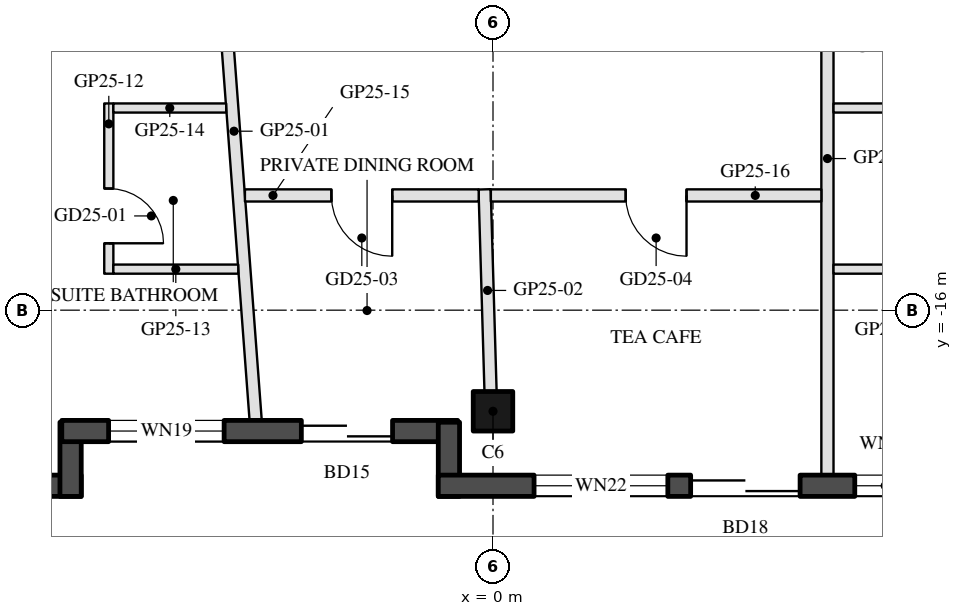
"""IFC4 building model, lengths in metres.
Left out: names, types, materials, properties, quantities, classifications, styles, units other than length and angle.
Written with IfcOpenShell. Run it as: python <this file> out.ifc"""

import sys

from ifc_helpers import new_model, si_unit, direction, frame, frame_2d, origin, origin_2d, place, context, subcontext, project, spatial, rectangle, hollow_rectangle, extrude, boolean, halfspace, element, fill, save


model = new_model("IFC4")
c1 = context("Model", 3, precision=1e-05, world=origin(), true_north=direction((0.0, 1.0)))
c2 = subcontext(c1, "Body", "Model", "MODEL_VIEW")
j1 = project(units=[si_unit("LENGTHUNIT", "METRE"), si_unit("PLANEANGLEUNIT", "RADIAN")], contexts=[c1])
p1 = place(None, origin())
s1 = spatial("IfcSite", under=j1, at=p1, CompositionType="ELEMENT")
p2 = place(p1, origin())
s2 = spatial("IfcBuilding", under=s1, at=p2, CompositionType="ELEMENT")
p3 = place(p2, frame((0.0, 0.0, 261.5)))
s3 = spatial("IfcBuildingStorey", under=s2, at=p3, CompositionType="ELEMENT", Elevation=261.5)
p4 = place(p3, frame((0.0, -17.663, 0.0), z_axis=(0.0, 0.0, 1.0), x_axis=(-1.0, 0.0, 0.0)))
e1 = element("IfcColumn", 1, at=p4, inside=s3, PredefinedType="COLUMN", context=c2, shape_type="SweptSolid", body=[
    boolean("DIFFERENCE", extrude(hollow_rectangle(XDim=0.65, YDim=0.65, WallThickness=0.03, at=origin_2d()), origin(), (0.0, 0.0, 1.0), 3.7), halfspace(frame((0.0, 0.0, 3.663), z_axis=(0.0, 0.0, 1.0), x_axis=(1.0, 0.0, 0.0)), False)),
])
p5 = place(p3, frame((-18.272, -18.888, 0.0), z_axis=(0.0, 0.0, 1.0), x_axis=(1.0, 0.0, 0.0)))
e2 = element("IfcWall", 2, at=p5, inside=s3, PredefinedType="SOLIDWALL", context=c2, shape_type="SweptSolid", body=[
    extrude(rectangle(XDim=11.5, YDim=0.35, at=frame_2d((5.75, 0.0))), origin(), (0.0, 0.0, 1.0), 3.55),
])
p6 = place(p5, frame((0.38, 0.0, 0.3)))
e3 = element("IfcOpeningElement", 3, at=p6, cuts=e2, PredefinedType="OPENING", context=c2, shape_type="SweptSolid", body=[
    extrude(rectangle(XDim=1.8, YDim=2.65, at=frame_2d((0.9, 1.325))), frame((0.0, 0.185, 0.0), z_axis=(0.0, -1.0, 0.0), x_axis=(1.0, 0.0, 0.0)), (0.0, 0.0, 1.0), 0.37),
])
p7 = place(p5, frame((7.525, 0.0, 0.0)))
e4 = element("IfcOpeningElement", 4, at=p7, cuts=e2, PredefinedType="OPENING", context=c2, shape_type="SweptSolid", body=[
    extrude(rectangle(XDim=2.4, YDim=2.4, at=frame_2d((1.2, 1.2))), frame((0.0, 0.185, 0.0), z_axis=(0.0, -1.0, 0.0), x_axis=(1.0, 0.0, 0.0)), (0.0, 0.0, 1.0), 0.37),
])
p8 = place(p5, frame((3.604, 0.0, 0.3)))
e5 = element("IfcOpeningElement", 5, at=p8, cuts=e2, PredefinedType="OPENING", context=c2, shape_type="SweptSolid", body=[
    extrude(rectangle(XDim=1.6, YDim=2.65, at=frame_2d((0.8, 1.325))), frame((0.0, 0.185, 0.0), z_axis=(0.0, -1.0, 0.0), x_axis=(1.0, 0.0, 0.0)), (0.0, 0.0, 1.0), 0.37),
])
p9 = place(p5, frame((5.504, 0.0, 0.3)))
e6 = element("IfcOpeningElement", 6, at=p9, cuts=e2, PredefinedType="OPENING", context=c2, shape_type="SweptSolid", body=[
    extrude(rectangle(XDim=1.6, YDim=2.65, at=frame_2d((0.8, 1.325))), frame((0.0, 0.185, 0.0), z_axis=(0.0, -1.0, 0.0), x_axis=(1.0, 0.0, 0.0)), (0.0, 0.0, 1.0), 0.37),
])
p10 = place(p3, frame((-6.947, -19.063, 0.0), z_axis=(0.0, 0.0, 1.0), x_axis=(0.0, 1.0, 0.0)))
e7 = element("IfcWall", 7, at=p10, inside=s3, PredefinedType="SOLIDWALL", context=c2, shape_type="SweptSolid", body=[
    extrude(rectangle(XDim=1.22, YDim=0.35, at=frame_2d((0.61, 0.0))), origin(), (0.0, 0.0, 1.0), 3.55),
])
p11 = place(p3, frame((-7.092, -17.988, 0.0), z_axis=(0.0, 0.0, 1.0), x_axis=(1.0, 0.0, 0.0)))
e8 = element("IfcWall", 8, at=p11, inside=s3, PredefinedType="SOLIDWALL", context=c2, shape_type="SweptSolid", body=[
    extrude(rectangle(XDim=6.512, YDim=0.35, at=frame_2d((3.256, 0.0))), origin(), (0.0, 0.0, 1.0), 3.55),
])
p12 = place(p11, frame((0.77, 0.0, 0.3)))
e9 = element("IfcOpeningElement", 9, at=p12, cuts=e8, PredefinedType="OPENING", context=c2, shape_type="SweptSolid", body=[
    extrude(rectangle(XDim=1.9, YDim=2.65, at=frame_2d((0.95, 1.325))), frame((0.0, 0.185, 0.0), z_axis=(0.0, -1.0, 0.0), x_axis=(1.0, 0.0, 0.0)), (0.0, 0.0, 1.0), 0.37),
])
p13 = place(p11, frame((3.94, 0.0, 0.0)))
e10 = element("IfcOpeningElement", 10, at=p13, cuts=e8, PredefinedType="OPENING", context=c2, shape_type="SweptSolid", body=[
    extrude(rectangle(XDim=1.5, YDim=2.4, at=frame_2d((0.75, 1.2))), frame((0.0, 0.185, 0.0), z_axis=(0.0, -1.0, 0.0), x_axis=(1.0, 0.0, 0.0)), (0.0, 0.0, 1.0), 0.37),
])
p14 = place(p3, frame((-0.725, -17.843, 0.0), z_axis=(0.0, 0.0, 1.0), x_axis=(0.0, -1.0, 0.0)))
e11 = element("IfcWall", 11, at=p14, inside=s3, PredefinedType="SOLIDWALL", context=c2, shape_type="SweptSolid", body=[
    extrude(rectangle(XDim=1.22, YDim=0.35, at=frame_2d((0.61, 0.0))), origin(), (0.0, 0.0, 1.0), 3.55),
])
p15 = place(p3, frame((-0.9, -18.888, 0.0), z_axis=(0.0, 0.0, 1.0), x_axis=(1.0, 0.0, 0.0)))
e12 = element("IfcWall", 12, at=p15, inside=s3, PredefinedType="SOLIDWALL", context=c2, shape_type="SweptSolid", body=[
    extrude(rectangle(XDim=9.472, YDim=0.35, at=frame_2d((4.736, 0.0))), origin(), (0.0, 0.0, 1.0), 3.55),
])
p16 = place(p15, frame((4.15, 0.0, 0.0)))
e13 = element("IfcOpeningElement", 13, at=p16, cuts=e12, PredefinedType="OPENING", context=c2, shape_type="SweptSolid", body=[
    extrude(rectangle(XDim=1.8, YDim=2.4, at=frame_2d((0.9, 1.2))), frame((0.0, 0.185, 0.0), z_axis=(0.0, -1.0, 0.0), x_axis=(1.0, 0.0, 0.0)), (0.0, 0.0, 1.0), 0.37),
])
p17 = place(p15, frame((1.575, 0.0, 0.3)))
e14 = element("IfcOpeningElement", 14, at=p17, cuts=e12, PredefinedType="OPENING", context=c2, shape_type="SweptSolid", body=[
    extrude(rectangle(XDim=2.2, YDim=2.65, at=frame_2d((1.1, 1.325))), frame((0.0, 0.185, 0.0), z_axis=(0.0, -1.0, 0.0), x_axis=(1.0, 0.0, 0.0)), (0.0, 0.0, 1.0), 0.37),
])
p18 = place(p15, frame((6.85, 0.0, 0.3)))
e15 = element("IfcOpeningElement", 15, at=p18, cuts=e12, PredefinedType="OPENING", context=c2, shape_type="SweptSolid", body=[
    extrude(rectangle(XDim=1.0, YDim=2.65, at=frame_2d((0.5, 1.325))), frame((0.0, 0.185, 0.0), z_axis=(0.0, -1.0, 0.0), x_axis=(1.0, 0.0, 0.0)), (0.0, 0.0, 1.0), 0.37),
])
p19 = place(p3, frame((-3.903, -17.813, 0.0), z_axis=(0.0, 0.0, 1.0), x_axis=(-0.074602257677, 0.997213368918, 0.0)))
e16 = element("IfcWall", 16, at=p19, inside=s3, PredefinedType="PARTITIONING", context=c2, shape_type="SweptSolid", body=[
    extrude(rectangle(XDim=9.54, YDim=0.2, at=frame_2d((4.77, 0.0))), origin(), (0.0, 0.0, 1.0), 3.0),
])
p20 = place(p3, frame((-0.04, -17.338, 0.0), z_axis=(0.0, 0.0, 1.0), x_axis=(-0.029431403757, 0.999566802406, 0.0)))
e17 = element("IfcWall", 17, at=p20, inside=s3, PredefinedType="PARTITIONING", context=c2, shape_type="SweptSolid", body=[
    extrude(rectangle(XDim=3.326, YDim=0.2, at=frame_2d((1.663, 0.0))), origin(), (0.0, 0.0, 1.0), 3.0),
])
p21 = place(p3, frame((5.5, -18.713, 0.0), z_axis=(0.0, 0.0, 1.0), x_axis=(0.0, 1.0, 0.0)))
e18 = element("IfcWall", 18, at=p21, inside=s3, PredefinedType="PARTITIONING", context=c2, shape_type="SweptSolid", body=[
    extrude(rectangle(XDim=10.413, YDim=0.2, at=frame_2d((5.207, 0.0))), origin(), (0.0, 0.0, 1.0), 3.1),
])
p22 = place(p3, frame((-6.319, -12.6, 0.0), z_axis=(0.0, 0.0, 1.0), x_axis=(0.0, -1.0, 0.0)))
e19 = element("IfcWall", 19, at=p22, inside=s3, PredefinedType="PARTITIONING", context=c2, shape_type="SweptSolid", body=[
    extrude(rectangle(XDim=2.8, YDim=0.15, at=frame_2d((1.4, 0.0))), origin(), (0.0, 0.0, 1.0), 3.55),
])
p23 = place(p22, frame((1.4, 0.0, 0.0)))
e20 = element("IfcOpeningElement", 20, at=p23, cuts=e19, PredefinedType="OPENING", context=c2, shape_type="SweptSolid", body=[
    extrude(rectangle(XDim=0.9, YDim=2.1, at=frame_2d((0.45, 1.05))), frame((0.0, 0.085, 0.0), z_axis=(0.0, -1.0, 0.0), x_axis=(1.0, 0.0, 0.0)), (0.0, 0.0, 1.0), 0.17),
])
p24 = place(p3, frame((-6.243, -15.325, 0.0), z_axis=(0.0, 0.0, 1.0), x_axis=(1.0, 0.0, 0.0)))
e21 = element("IfcWall", 21, at=p24, inside=s3, PredefinedType="PARTITIONING", context=c2, shape_type="SweptSolid", body=[
    extrude(rectangle(XDim=2.054, YDim=0.15, at=frame_2d((1.027, 0.0))), origin(), (0.0, 0.0, 1.0), 3.55),
])
p25 = place(p3, frame((-6.243, -12.675, 0.0), z_axis=(0.0, 0.0, 1.0), x_axis=(1.0, 0.0, 0.0)))
e22 = element("IfcWall", 22, at=p25, inside=s3, PredefinedType="PARTITIONING", context=c2, shape_type="SweptSolid", body=[
    extrude(rectangle(XDim=1.855, YDim=0.15, at=frame_2d((0.928, 0.0))), origin(), (0.0, 0.0, 1.0), 3.55),
])
p26 = place(p3, frame((-0.235, -14.113, 0.0), z_axis=(0.0, 0.0, 1.0), x_axis=(-1.0, 0.0, 0.0)))
e23 = element("IfcWall", 23, at=p26, inside=s3, PredefinedType="PARTITIONING", context=c2, shape_type="SweptSolid", body=[
    extrude(rectangle(XDim=3.845, YDim=0.2, at=frame_2d((1.922, 0.0))), origin(), (0.0, 0.0, 1.0), 3.0),
])
p27 = place(p26, frame((1.422, 0.0, 0.0)))
e24 = element("IfcOpeningElement", 24, at=p27, cuts=e23, PredefinedType="OPENING", context=c2, shape_type="SweptSolid", body=[
    extrude(rectangle(XDim=1.0, YDim=2.1, at=frame_2d((0.5, 1.05))), frame((0.0, 0.11, 0.0), z_axis=(0.0, -1.0, 0.0), x_axis=(1.0, 0.0, 0.0)), (0.0, 0.0, 1.0), 0.22),
])
p28 = place(p3, frame((5.4, -14.113, 0.0), z_axis=(0.0, 0.0, 1.0), x_axis=(-1.0, 0.0, 0.0)))
e25 = element("IfcWall", 25, at=p28, inside=s3, PredefinedType="PARTITIONING", context=c2, shape_type="SweptSolid", body=[
    extrude(rectangle(XDim=5.435, YDim=0.2, at=frame_2d((2.718, 0.0))), origin(), (0.0, 0.0, 1.0), 3.0),
])
p29 = place(p28, frame((2.218, 0.0, 0.0)))
e26 = element("IfcOpeningElement", 26, at=p29, cuts=e25, PredefinedType="OPENING", context=c2, shape_type="SweptSolid", body=[
    extrude(rectangle(XDim=1.0, YDim=2.1, at=frame_2d((0.5, 1.05))), frame((0.0, 0.11, 0.0), z_axis=(0.0, -1.0, 0.0), x_axis=(1.0, 0.0, 0.0)), (0.0, 0.0, 1.0), 0.22),
])
for number, where, z_axis, x_axis in (
    (27, (5.6, -15.325, 0.0), (0.0, 0.0, 1.0), (1.0, 0.0, 0.0)),
    (28, (5.6, -12.675, 0.0), (0.0, 0.0, 1.0), (1.0, 0.0, 0.0)),
):
    element("IfcWall", number, at=place(p3, frame(where, z_axis=z_axis, x_axis=x_axis)), inside=s3, PredefinedType="PARTITIONING", context=c2, shape_type="SweptSolid", body=[
        extrude(rectangle(XDim=1.85, YDim=0.15, at=frame_2d((0.925, 0.0))), origin(), (0.0, 0.0, 1.0), 3.55),
    ])
p30 = place(p12, origin())
e29 = element("IfcWindow", 29, at=p30, inside=s3, PartitioningType="SINGLE_PANEL", PredefinedType="WINDOW", context=c2, shape_type="SweptSolid", body=[
    extrude(rectangle(XDim=1.9, YDim=2.65, at=frame_2d((0.95, 1.325))), frame((0.0, 0.03, 0.0), z_axis=(0.0, -1.0, 0.0), x_axis=(1.0, 0.0, 0.0)), (0.0, 0.0, 1.0), 0.06),
])
fill(e9, e29)
p31 = place(p13, frame((1.5, 0.0, 0.0), z_axis=(0.0, 0.0, 1.0), x_axis=(-1.0, 0.0, 0.0)))
e30 = element("IfcDoor", 30, at=p31, inside=s3, OperationType="SLIDING_TO_LEFT", PredefinedType="DOOR", context=c2, shape_type="SweptSolid", body=[
    extrude(rectangle(XDim=1.5, YDim=2.4, at=frame_2d((0.75, 1.2))), frame((0.0, 0.025, 0.0), z_axis=(0.0, -1.0, 0.0), x_axis=(1.0, 0.0, 0.0)), (0.0, 0.0, 1.0), 0.05),
])
fill(e10, e30)
p32 = place(p16, frame((1.8, 0.0, 0.0), z_axis=(0.0, 0.0, 1.0), x_axis=(-1.0, 0.0, 0.0)))
e31 = element("IfcDoor", 31, at=p32, inside=s3, OperationType="SLIDING_TO_LEFT", PredefinedType="DOOR", context=c2, shape_type="SweptSolid", body=[
    extrude(rectangle(XDim=1.8, YDim=2.4, at=frame_2d((0.9, 1.2))), frame((0.0, 0.025, 0.0), z_axis=(0.0, -1.0, 0.0), x_axis=(1.0, 0.0, 0.0)), (0.0, 0.0, 1.0), 0.05),
])
fill(e13, e31)
p33 = place(p17, origin())
e32 = element("IfcWindow", 32, at=p33, inside=s3, PartitioningType="SINGLE_PANEL", PredefinedType="WINDOW", context=c2, shape_type="SweptSolid", body=[
    extrude(rectangle(XDim=2.2, YDim=2.65, at=frame_2d((1.1, 1.325))), frame((0.0, 0.03, 0.0), z_axis=(0.0, -1.0, 0.0), x_axis=(1.0, 0.0, 0.0)), (0.0, 0.0, 1.0), 0.06),
])
fill(e14, e32)
p34 = place(p18, origin())
e33 = element("IfcWindow", 33, at=p34, inside=s3, PartitioningType="SINGLE_PANEL", PredefinedType="WINDOW", context=c2, shape_type="SweptSolid", body=[
    extrude(rectangle(XDim=1.0, YDim=2.65, at=frame_2d((0.5, 1.325))), frame((0.0, 0.03, 0.0), z_axis=(0.0, -1.0, 0.0), x_axis=(1.0, 0.0, 0.0)), (0.0, 0.0, 1.0), 0.06),
])
fill(e15, e33)
p35 = place(p23, origin())
e34 = element("IfcDoor", 34, at=p35, inside=s3, OperationType="SINGLE_SWING_RIGHT", PredefinedType="DOOR", context=c2, shape_type="SweptSolid", body=[
    extrude(rectangle(XDim=0.9, YDim=2.1, at=frame_2d((0.45, 1.05))), frame((0.0, 0.025, 0.0), z_axis=(0.0, -1.0, 0.0), x_axis=(1.0, 0.0, 0.0)), (0.0, 0.0, 1.0), 0.05),
])
fill(e20, e34)
p36 = place(p27, origin())
e35 = element("IfcDoor", 35, at=p36, inside=s3, OperationType="SINGLE_SWING_LEFT", PredefinedType="DOOR", context=c2, shape_type="SweptSolid", body=[
    extrude(rectangle(XDim=1.0, YDim=2.1, at=frame_2d((0.5, 1.05))), frame((0.0, 0.025, 0.0), z_axis=(0.0, -1.0, 0.0), x_axis=(1.0, 0.0, 0.0)), (0.0, 0.0, 1.0), 0.05),
])
fill(e24, e35)
p37 = place(p29, origin())
e36 = element("IfcDoor", 36, at=p37, inside=s3, OperationType="SINGLE_SWING_LEFT", PredefinedType="DOOR", context=c2, shape_type="SweptSolid", body=[
    extrude(rectangle(XDim=1.0, YDim=2.1, at=frame_2d((0.5, 1.05))), frame((0.0, 0.025, 0.0), z_axis=(0.0, -1.0, 0.0), x_axis=(1.0, 0.0, 0.0)), (0.0, 0.0, 1.0), 0.05),
])
fill(e26, e36)
save(model, sys.argv[1])
